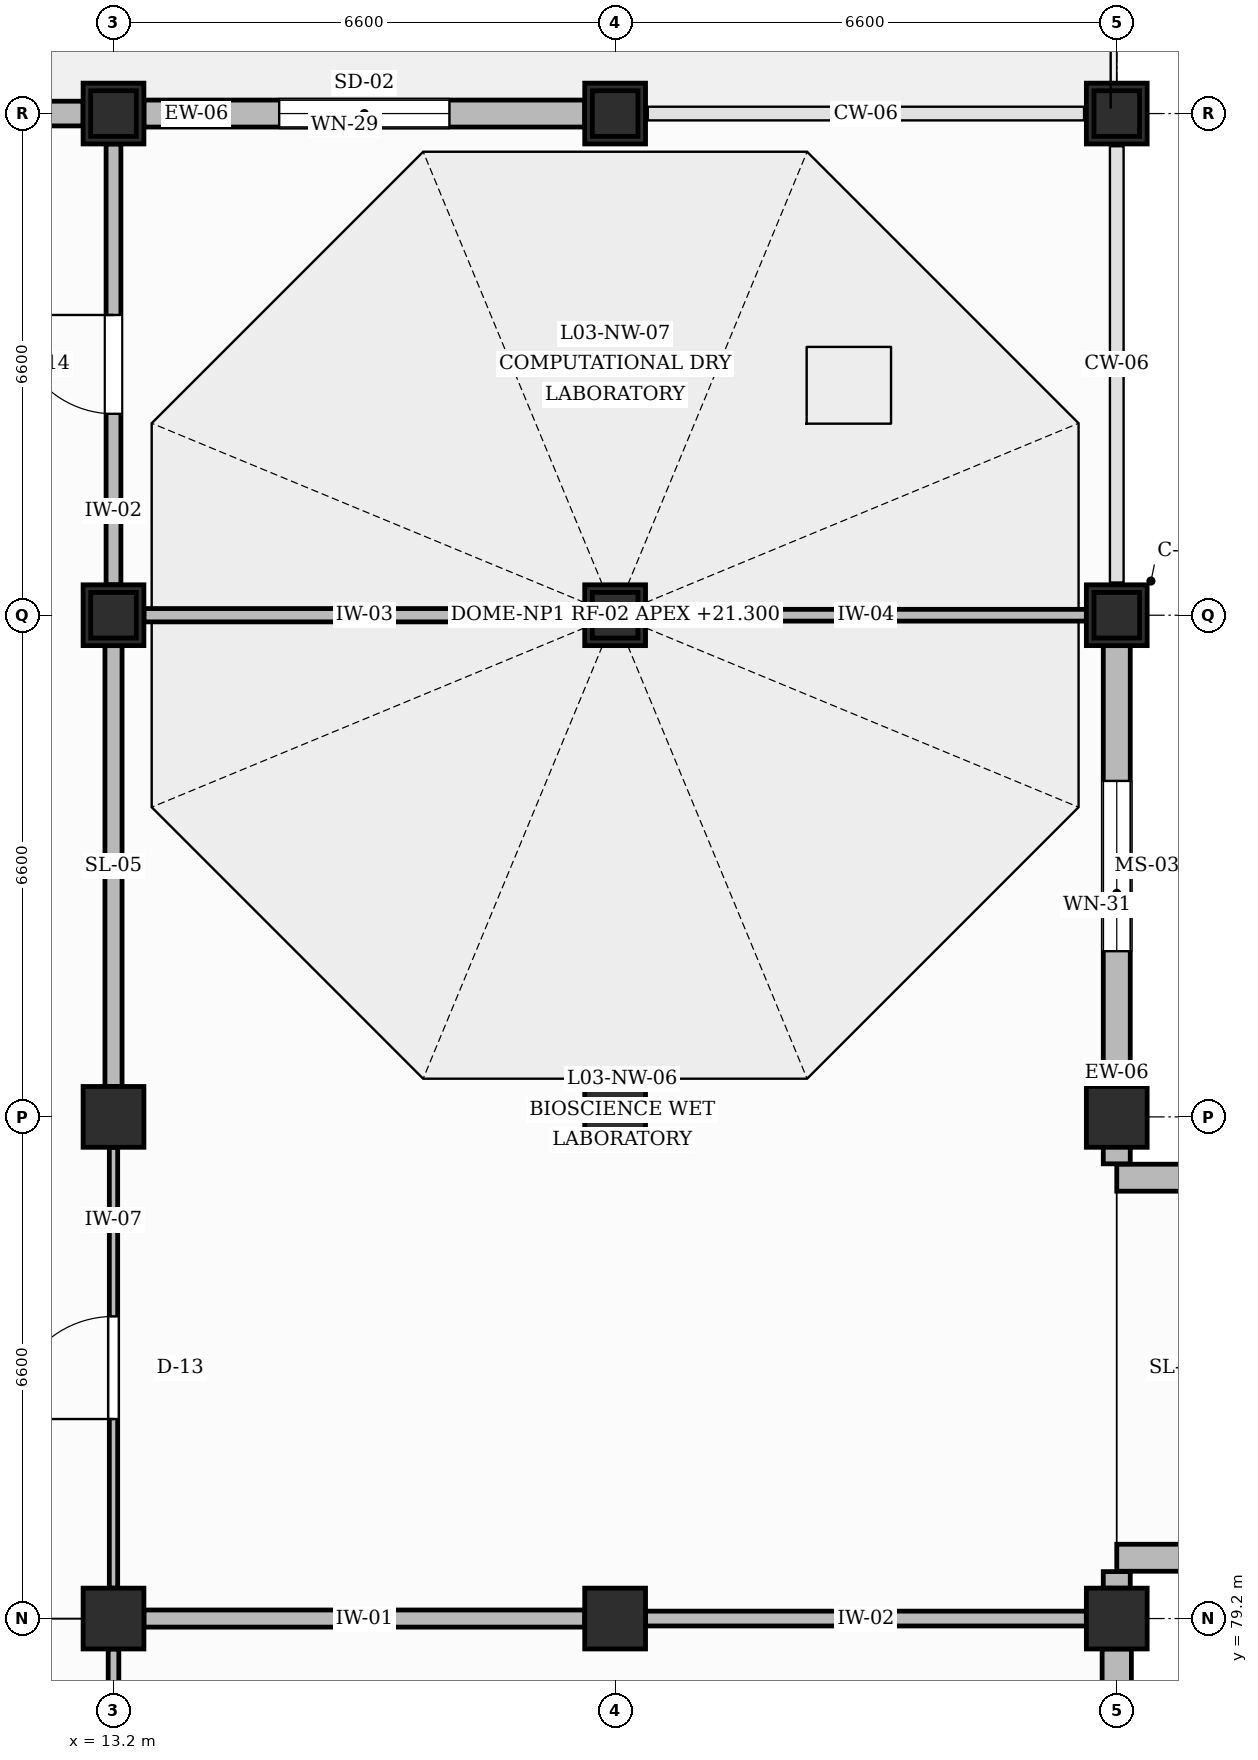
"""IFC4 building model, lengths in metres.
Left out: names, types, materials, properties, quantities, classifications, styles, units other than length and angle.
Written with IfcOpenShell. Run it as: python <this file> out.ifc"""

import sys

from ifc_helpers import new_model, si_unit, direction, frame, frame_2d, origin, origin_2d, place, context, subcontext, project, spatial, rectangle, extrude, element, fill, save


model = new_model("IFC4")
c1 = context("Model", 3, precision=1e-05, world=origin(), true_north=direction((0.0, 1.0)))
c2 = subcontext(c1, "Body", "Model", "MODEL_VIEW")
j1 = project(units=[si_unit("LENGTHUNIT", "METRE"), si_unit("PLANEANGLEUNIT", "RADIAN")], contexts=[c1])
p1 = place(None, origin())
s1 = spatial("IfcSite", under=j1, at=p1, CompositionType="ELEMENT")
p2 = place(p1, origin())
s2 = spatial("IfcBuilding", under=s1, at=p2, CompositionType="ELEMENT")
p3 = place(p2, frame((0.0, 0.0, 14.4)))
s3 = spatial("IfcBuildingStorey", under=s2, at=p3, CompositionType="ELEMENT", Elevation=14.4)
for number, where, z_axis, x_axis in (
    (1, (13.2, 79.2, 0.0), (0.0, 0.0, 1.0), (1.0, 0.0, 0.0)),
    (2, (13.2, 85.8, 0.0), (0.0, 0.0, 1.0), (1.0, 0.0, 0.0)),
    (3, (13.2, 92.4, 0.0), (0.0, 0.0, 1.0), (1.0, 0.0, 0.0)),
    (4, (13.2, 99.0, 0.0), (0.0, 0.0, 1.0), (1.0, 0.0, 0.0)),
    (5, (19.8, 79.2, 0.0), (0.0, 0.0, 1.0), (1.0, 0.0, 0.0)),
    (6, (19.8, 85.8, 0.0), (0.0, 0.0, 1.0), (1.0, 0.0, 0.0)),
    (7, (19.8, 92.4, 0.0), (0.0, 0.0, 1.0), (1.0, 0.0, 0.0)),
    (8, (19.8, 99.0, 0.0), (0.0, 0.0, 1.0), (1.0, 0.0, 0.0)),
    (9, (26.4, 79.2, 0.0), (0.0, 0.0, 1.0), (1.0, 0.0, 0.0)),
    (10, (26.4, 85.8, 0.0), (0.0, 0.0, 1.0), (1.0, 0.0, 0.0)),
    (11, (26.4, 92.4, 0.0), (0.0, 0.0, 1.0), (1.0, 0.0, 0.0)),
    (12, (26.4, 99.0, 0.0), (0.0, 0.0, 1.0), (1.0, 0.0, 0.0)),
):
    element("IfcColumn", number, at=place(p3, frame(where, z_axis=z_axis, x_axis=x_axis)), inside=s3, PredefinedType="COLUMN", context=c2, shape_type="SweptSolid", body=[
        extrude(rectangle(XDim=0.8, YDim=0.8, at=origin_2d()), origin(), (0.0, 0.0, 1.0), 4.2),
    ])
for number, where, z_axis, x_axis in (
    (13, (26.4, 92.4, 4.2), (0.0, 0.0, 1.0), (1.0, 0.0, 0.0)),
    (14, (26.4, 99.0, 4.2), (0.0, 0.0, 1.0), (1.0, 0.0, 0.0)),
    (15, (19.8, 99.0, 4.2), (0.0, 0.0, 1.0), (1.0, 0.0, 0.0)),
    (16, (13.2, 99.0, 4.2), (0.0, 0.0, 1.0), (1.0, 0.0, 0.0)),
    (17, (13.2, 92.4, 4.2), (0.0, 0.0, 1.0), (1.0, 0.0, 0.0)),
):
    element("IfcColumn", number, at=place(p3, frame(where, z_axis=z_axis, x_axis=x_axis)), inside=s3, PredefinedType="COLUMN", context=c2, shape_type="SweptSolid", body=[
        extrude(rectangle(XDim=0.6, YDim=0.6, at=origin_2d()), origin(), (0.0, 0.0, 1.0), 0.65),
    ])
p4 = place(p3, frame((19.8, 92.4, 4.2), z_axis=(0.0, 0.0, 1.0), x_axis=(1.0, 0.0, 0.0)))
e18 = element("IfcColumn", 18, at=p4, inside=s3, PredefinedType="COLUMN", context=c2, shape_type="SweptSolid", body=[
    extrude(rectangle(XDim=0.6, YDim=0.6, at=origin_2d()), origin(), (0.0, 0.0, 1.0), 2.36),
])
p5 = place(p3, frame((7.0, 99.0, 0.0), z_axis=(0.0, 0.0, 1.0), x_axis=(1.0, 0.0, 0.0)))
e19 = element("IfcWall", 19, at=p5, inside=s3, PredefinedType="SOLIDWALL", context=c2, shape_type="SweptSolid", body=[
    extrude(rectangle(XDim=5.8, YDim=0.325, at=frame_2d((2.9, 0.0))), origin(), (0.0, 0.0, 1.0), 3.26),
])
p6 = place(p5, frame((2.3, 0.0, 0.0)))
e20 = element("IfcOpeningElement", 20, at=p6, cuts=e19, PredefinedType="OPENING", context=c2, shape_type="SweptSolid", body=[
    extrude(rectangle(XDim=1.2, YDim=2.15, at=frame_2d((0.6, 1.075))), frame((0.0, 0.172, 0.0), z_axis=(0.0, -1.0, 0.0), x_axis=(1.0, 0.0, 0.0)), (0.0, 0.0, 1.0), 0.345),
])
p7 = place(p3, frame((13.6, 99.0, 0.0), z_axis=(0.0, 0.0, 1.0), x_axis=(1.0, 0.0, 0.0)))
e21 = element("IfcWall", 21, at=p7, inside=s3, PredefinedType="SOLIDWALL", context=c2, shape_type="SweptSolid", body=[
    extrude(rectangle(XDim=5.8, YDim=0.355, at=frame_2d((2.9, 0.0))), origin(), (0.0, 0.0, 1.0), 3.26),
])
p8 = place(p7, frame((1.78, 0.0, 0.95)))
e22 = element("IfcOpeningElement", 22, at=p8, cuts=e21, PredefinedType="OPENING", context=c2, shape_type="SweptSolid", body=[
    extrude(rectangle(XDim=2.24, YDim=1.3, at=frame_2d((1.12, 0.65))), frame((0.0, 0.188, 0.0), z_axis=(0.0, -1.0, 0.0), x_axis=(1.0, 0.0, 0.0)), (0.0, 0.0, 1.0), 0.375),
])
p9 = place(p3, frame((26.4, 73.0, 0.0), z_axis=(0.0, 0.0, 1.0), x_axis=(0.0, 1.0, 0.0)))
e23 = element("IfcWall", 23, at=p9, inside=s3, PredefinedType="SOLIDWALL", context=c2, shape_type="SweptSolid", body=[
    extrude(rectangle(XDim=5.8, YDim=0.385, at=frame_2d((2.9, 0.0))), origin(), (0.0, 0.0, 1.0), 3.26),
])
p10 = place(p9, frame((1.78, 0.0, 0.95)))
e24 = element("IfcOpeningElement", 24, at=p10, cuts=e23, PredefinedType="OPENING", context=c2, shape_type="SweptSolid", body=[
    extrude(rectangle(XDim=2.24, YDim=1.52, at=frame_2d((1.12, 0.76))), frame((0.0, 0.202, 0.0), z_axis=(0.0, -1.0, 0.0), x_axis=(1.0, 0.0, 0.0)), (0.0, 0.0, 1.0), 0.405),
])
for number, where, z_axis, x_axis in (
    (25, (26.4, 79.6, 0.0), (0.0, 0.0, 1.0), (0.0, 1.0, 0.0)),
    (26, (26.4, 85.183, 0.0), (0.0, 0.0, 1.0), (0.0, 1.0, 0.0)),
):
    element("IfcWall", number, at=place(p3, frame(where, z_axis=z_axis, x_axis=x_axis)), inside=s3, PredefinedType="SOLIDWALL", context=c2, shape_type="SweptSolid", body=[
        extrude(rectangle(XDim=0.217, YDim=0.355, at=frame_2d((0.109, 0.0))), origin(), (0.0, 0.0, 1.0), 3.26),
    ])
for number, where, z_axis, x_axis in (
    (27, (26.4, 80.0, 0.0), (0.0, 0.0, 1.0), (1.0, 0.0, 0.0)),
    (28, (26.4, 85.0, 0.0), (0.0, 0.0, 1.0), (1.0, 0.0, 0.0)),
):
    element("IfcWall", number, at=place(p3, frame(where, z_axis=z_axis, x_axis=x_axis)), inside=s3, PredefinedType="SOLIDWALL", context=c2, shape_type="SweptSolid", body=[
        extrude(rectangle(XDim=1.6, YDim=0.355, at=frame_2d((0.8, 0.0))), origin(), (0.0, 0.0, 1.0), 3.26),
    ])
p11 = place(p3, frame((26.4, 86.2, 0.0), z_axis=(0.0, 0.0, 1.0), x_axis=(0.0, 1.0, 0.0)))
e29 = element("IfcWall", 29, at=p11, inside=s3, PredefinedType="SOLIDWALL", context=c2, shape_type="SweptSolid", body=[
    extrude(rectangle(XDim=5.8, YDim=0.355, at=frame_2d((2.9, 0.0))), origin(), (0.0, 0.0, 1.0), 3.26),
])
p12 = place(p11, frame((1.78, 0.0, 0.95)))
e30 = element("IfcOpeningElement", 30, at=p12, cuts=e29, PredefinedType="OPENING", context=c2, shape_type="SweptSolid", body=[
    extrude(rectangle(XDim=2.24, YDim=1.74, at=frame_2d((1.12, 0.87))), frame((0.0, 0.188, 0.0), z_axis=(0.0, -1.0, 0.0), x_axis=(1.0, 0.0, 0.0)), (0.0, 0.0, 1.0), 0.375),
])
p13 = place(p3, frame((13.2, 73.0, 0.0), z_axis=(0.0, 0.0, 1.0), x_axis=(0.0, 1.0, 0.0)))
e31 = element("IfcWall", 31, at=p13, inside=s3, PredefinedType="PARTITIONING", context=c2, shape_type="SweptSolid", body=[
    extrude(rectangle(XDim=5.8, YDim=0.14, at=frame_2d((2.9, 0.0))), origin(), (0.0, 0.0, 1.0), 3.16),
])
p14 = place(p3, frame((13.2, 79.6, 0.0), z_axis=(0.0, 0.0, 1.0), x_axis=(0.0, 1.0, 0.0)))
e32 = element("IfcWall", 32, at=p14, inside=s3, PredefinedType="PARTITIONING", context=c2, shape_type="SweptSolid", body=[
    extrude(rectangle(XDim=5.8, YDim=0.11, at=frame_2d((2.9, 0.0))), origin(), (0.0, 0.0, 1.0), 3.16),
])
p15 = place(p14, frame((2.225, 0.0, 0.0)))
e33 = element("IfcOpeningElement", 33, at=p15, cuts=e32, PredefinedType="OPENING", context=c2, shape_type="SweptSolid", body=[
    extrude(rectangle(XDim=1.35, YDim=2.3, at=frame_2d((0.675, 1.15))), frame((0.0, 0.065, 0.0), z_axis=(0.0, -1.0, 0.0), x_axis=(1.0, 0.0, 0.0)), (0.0, 0.0, 1.0), 0.13),
])
p16 = place(p3, frame((13.2, 86.2, 0.0), z_axis=(0.0, 0.0, 1.0), x_axis=(0.0, 1.0, 0.0)))
e34 = element("IfcWall", 34, at=p16, inside=s3, PredefinedType="PARTITIONING", context=c2, shape_type="SweptSolid", body=[
    extrude(rectangle(XDim=5.8, YDim=0.225, at=frame_2d((2.9, 0.0))), origin(), (0.0, 0.0, 1.0), 3.16),
])
p17 = place(p3, frame((13.2, 92.8, 0.0), z_axis=(0.0, 0.0, 1.0), x_axis=(0.0, 1.0, 0.0)))
e35 = element("IfcWall", 35, at=p17, inside=s3, PredefinedType="PARTITIONING", context=c2, shape_type="SweptSolid", body=[
    extrude(rectangle(XDim=5.8, YDim=0.195, at=frame_2d((2.9, 0.0))), origin(), (0.0, 0.0, 1.0), 3.16),
])
p18 = place(p17, frame((2.25, 0.0, 0.0)))
e36 = element("IfcOpeningElement", 36, at=p18, cuts=e35, PredefinedType="OPENING", context=c2, shape_type="SweptSolid", body=[
    extrude(rectangle(XDim=1.3, YDim=2.3, at=frame_2d((0.65, 1.15))), frame((0.0, 0.107, 0.0), z_axis=(0.0, -1.0, 0.0), x_axis=(1.0, 0.0, 0.0)), (0.0, 0.0, 1.0), 0.215),
])
p19 = place(p3, frame((13.6, 79.2, 0.0), z_axis=(0.0, 0.0, 1.0), x_axis=(1.0, 0.0, 0.0)))
e37 = element("IfcWall", 37, at=p19, inside=s3, PredefinedType="PARTITIONING", context=c2, shape_type="SweptSolid", body=[
    extrude(rectangle(XDim=5.8, YDim=0.225, at=frame_2d((2.9, 0.0))), origin(), (0.0, 0.0, 1.0), 3.16),
])
p20 = place(p3, frame((13.6, 92.4, 0.0), z_axis=(0.0, 0.0, 1.0), x_axis=(1.0, 0.0, 0.0)))
e38 = element("IfcWall", 38, at=p20, inside=s3, PredefinedType="PARTITIONING", context=c2, shape_type="SweptSolid", body=[
    extrude(rectangle(XDim=5.8, YDim=0.175, at=frame_2d((2.9, 0.0))), origin(), (0.0, 0.0, 1.0), 3.16),
])
p21 = place(p3, frame((20.2, 79.2, 0.0), z_axis=(0.0, 0.0, 1.0), x_axis=(1.0, 0.0, 0.0)))
e39 = element("IfcWall", 39, at=p21, inside=s3, PredefinedType="PARTITIONING", context=c2, shape_type="SweptSolid", body=[
    extrude(rectangle(XDim=5.8, YDim=0.195, at=frame_2d((2.9, 0.0))), origin(), (0.0, 0.0, 1.0), 3.41),
])
p22 = place(p3, frame((20.2, 92.4, 0.0), z_axis=(0.0, 0.0, 1.0), x_axis=(1.0, 0.0, 0.0)))
e40 = element("IfcWall", 40, at=p22, inside=s3, PredefinedType="PARTITIONING", context=c2, shape_type="SweptSolid", body=[
    extrude(rectangle(XDim=5.8, YDim=0.155, at=frame_2d((2.9, 0.0))), origin(), (0.0, 0.0, 1.0), 3.16),
])
p23 = place(p8, origin())
e41 = element("IfcWindow", 41, at=p23, inside=s3, PartitioningType="DOUBLE_PANEL_VERTICAL", PredefinedType="WINDOW", context=c2, shape_type="SweptSolid", body=[
    extrude(rectangle(XDim=2.24, YDim=1.3, at=frame_2d((1.12, 0.65))), frame((0.0, 0.03, 0.0), z_axis=(0.0, -1.0, 0.0), x_axis=(1.0, 0.0, 0.0)), (0.0, 0.0, 1.0), 0.06),
])
fill(e22, e41)
p24 = place(p12, origin())
e42 = element("IfcWindow", 42, at=p24, inside=s3, PartitioningType="DOUBLE_PANEL_VERTICAL", PredefinedType="WINDOW", context=c2, shape_type="SweptSolid", body=[
    extrude(rectangle(XDim=2.24, YDim=1.74, at=frame_2d((1.12, 0.87))), frame((0.0, 0.03, 0.0), z_axis=(0.0, -1.0, 0.0), x_axis=(1.0, 0.0, 0.0)), (0.0, 0.0, 1.0), 0.06),
])
fill(e30, e42)
p25 = place(p15, origin())
e43 = element("IfcDoor", 43, at=p25, inside=s3, OperationType="SINGLE_SWING_LEFT", PredefinedType="DOOR", context=c2, shape_type="SweptSolid", body=[
    extrude(rectangle(XDim=1.35, YDim=2.3, at=frame_2d((0.675, 1.15))), frame((0.0, 0.025, 0.0), z_axis=(0.0, -1.0, 0.0), x_axis=(1.0, 0.0, 0.0)), (0.0, 0.0, 1.0), 0.05),
])
fill(e33, e43)
p26 = place(p18, origin())
e44 = element("IfcDoor", 44, at=p26, inside=s3, OperationType="SINGLE_SWING_RIGHT", PredefinedType="DOOR", context=c2, shape_type="SweptSolid", body=[
    extrude(rectangle(XDim=1.3, YDim=2.3, at=frame_2d((0.65, 1.15))), frame((0.0, 0.025, 0.0), z_axis=(0.0, -1.0, 0.0), x_axis=(1.0, 0.0, 0.0)), (0.0, 0.0, 1.0), 0.05),
])
fill(e36, e44)
save(model, sys.argv[1])
